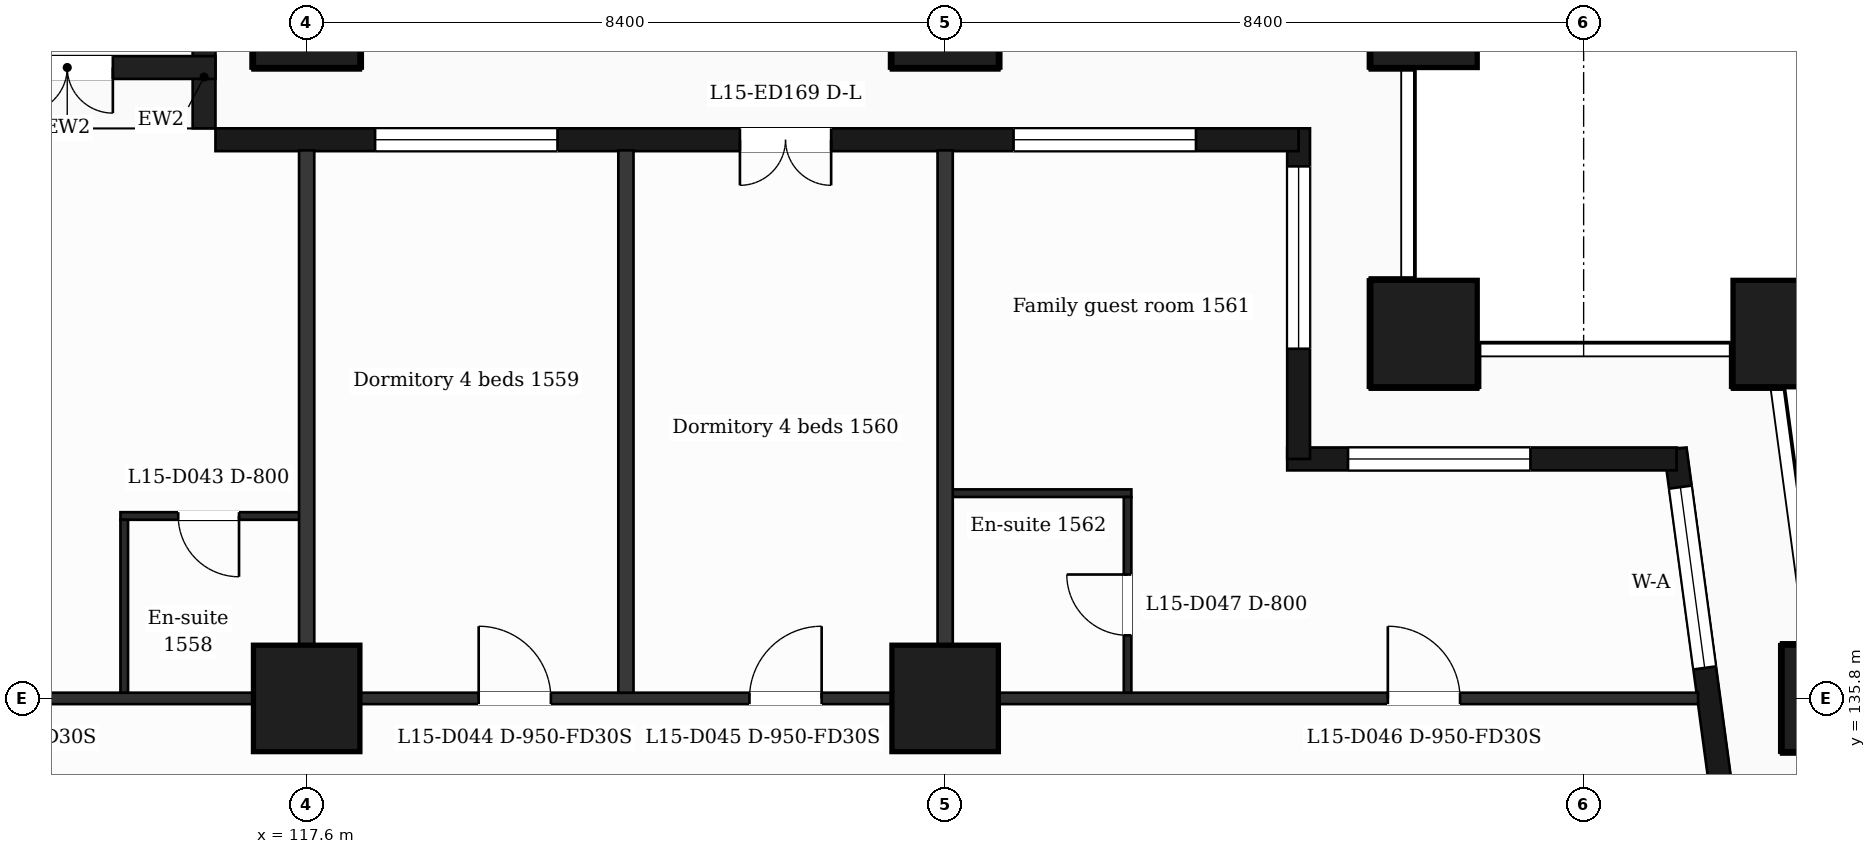
"""IFC4 building model, lengths in metres.
Left out: names, types, materials, properties, quantities, classifications, styles, units other than length and angle.
Written with IfcOpenShell. Run it as: python <this file> out.ifc"""

import sys

from ifc_helpers import new_model, si_unit, direction, frame, frame_2d, origin, origin_2d, place, context, subcontext, project, spatial, rectangle, extrude, element, fill, save


model = new_model("IFC4")
c1 = context("Model", 3, precision=1e-05, world=origin(), true_north=direction((0.0, 1.0)))
c2 = subcontext(c1, "Body", "Model", "MODEL_VIEW")
j1 = project(units=[si_unit("LENGTHUNIT", "METRE"), si_unit("PLANEANGLEUNIT", "RADIAN")], contexts=[c1])
p1 = place(None, origin())
s1 = spatial("IfcSite", under=j1, at=p1, CompositionType="ELEMENT")
p2 = place(p1, origin())
s2 = spatial("IfcBuilding", under=s1, at=p2, CompositionType="ELEMENT")
p3 = place(p2, frame((0.0, 0.0, 70.5)))
s3 = spatial("IfcBuildingStorey", under=s2, at=p3, CompositionType="ELEMENT", Elevation=70.5)
for number, where, z_axis, x_axis in (
    (1, (132.3, 140.6, 0.0), (0.0, 0.0, 1.0), (1.0, 0.0, 0.0)),
    (2, (137.065, 140.6, 0.0), (0.0, 0.0, 1.0), (1.0, 0.0, 0.0)),
    (3, (117.6, 135.8, 0.0), (0.0, 0.0, 1.0), (1.0, 0.0, 0.0)),
    (4, (126.0, 135.8, 0.0), (0.0, 0.0, 1.0), (1.0, 0.0, 0.0)),
    (5, (137.711, 135.8, 0.0), (0.0, 0.0, 1.0), (1.0, 0.0, 0.0)),
    (6, (117.6, 144.8, 0.0), (0.0, 0.0, 1.0), (1.0, 0.0, 0.0)),
    (7, (126.0, 144.8, 0.0), (0.0, 0.0, 1.0), (1.0, 0.0, 0.0)),
    (8, (132.3, 144.8, 0.0), (0.0, 0.0, 1.0), (1.0, 0.0, 0.0)),
):
    element("IfcColumn", number, at=place(p3, frame(where, z_axis=z_axis, x_axis=x_axis)), inside=s3, PredefinedType="COLUMN", context=c2, shape_type="SweptSolid", body=[
        extrude(rectangle(XDim=1.4, YDim=1.4, at=origin_2d()), origin(), (0.0, 0.0, 1.0), 3.5),
    ])
p4 = place(p3, frame((136.504, 132.4, 0.0), z_axis=(0.0, 0.0, 1.0), x_axis=(-0.133399697462, 0.99106231929, 0.0)))
e9 = element("IfcWall", 9, at=p4, inside=s3, PredefinedType="SOLIDWALL", context=c2, shape_type="SweptSolid", body=[
    extrude(rectangle(XDim=6.74, YDim=0.3, at=frame_2d((3.37, 0.0))), origin(), (0.0, 0.0, 1.0), 3.18),
])
p5 = place(p4, frame((1.115, 0.0, 0.0)))
e10 = element("IfcOpeningElement", 10, at=p5, cuts=e9, PredefinedType="OPENING", context=c2, shape_type="SweptSolid", body=[
    extrude(rectangle(XDim=1.2, YDim=2.4, at=frame_2d((0.6, 1.2))), frame((0.0, 0.16, 0.0), z_axis=(0.0, -1.0, 0.0), x_axis=(1.0, 0.0, 0.0)), (0.0, 0.0, 1.0), 0.32),
])
p6 = place(p4, frame((3.835, 0.0, 0.9)))
e11 = element("IfcOpeningElement", 11, at=p6, cuts=e9, PredefinedType="OPENING", context=c2, shape_type="SweptSolid", body=[
    extrude(rectangle(XDim=2.4, YDim=2.1, at=frame_2d((1.2, 1.05))), frame((0.0, 0.16, 0.0), z_axis=(0.0, -1.0, 0.0), x_axis=(1.0, 0.0, 0.0)), (0.0, 0.0, 1.0), 0.32),
])
p7 = place(p3, frame((135.623, 138.95, 0.0), z_axis=(0.0, 0.0, 1.0), x_axis=(-1.0, 0.0, 0.0)))
e12 = element("IfcWall", 12, at=p7, inside=s3, PredefinedType="SOLIDWALL", context=c2, shape_type="SweptSolid", body=[
    extrude(rectangle(XDim=5.123, YDim=0.3, at=frame_2d((2.561, 0.0))), origin(), (0.0, 0.0, 1.0), 3.18),
])
p8 = place(p7, frame((1.923, 0.0, 0.9)))
e13 = element("IfcOpeningElement", 13, at=p8, cuts=e12, PredefinedType="OPENING", context=c2, shape_type="SweptSolid", body=[
    extrude(rectangle(XDim=2.4, YDim=2.1, at=frame_2d((1.2, 1.05))), frame((0.0, 0.16, 0.0), z_axis=(0.0, -1.0, 0.0), x_axis=(1.0, 0.0, 0.0)), (0.0, 0.0, 1.0), 0.32),
])
p9 = place(p3, frame((130.65, 138.95, 0.0), z_axis=(0.0, 0.0, 1.0), x_axis=(0.0, 1.0, 0.0)))
e14 = element("IfcWall", 14, at=p9, inside=s3, PredefinedType="SOLIDWALL", context=c2, shape_type="SweptSolid", body=[
    extrude(rectangle(XDim=4.35, YDim=0.3, at=frame_2d((2.175, 0.0))), origin(), (0.0, 0.0, 1.0), 3.18),
])
p10 = place(p9, frame((1.45, 0.0, 0.9)))
e15 = element("IfcOpeningElement", 15, at=p10, cuts=e14, PredefinedType="OPENING", context=c2, shape_type="SweptSolid", body=[
    extrude(rectangle(XDim=2.4, YDim=2.1, at=frame_2d((1.2, 1.05))), frame((0.0, 0.16, 0.0), z_axis=(0.0, -1.0, 0.0), x_axis=(1.0, 0.0, 0.0)), (0.0, 0.0, 1.0), 0.32),
])
p11 = place(p3, frame((130.65, 143.15, 0.0), z_axis=(0.0, 0.0, 1.0), x_axis=(-1.0, 0.0, 0.0)))
e16 = element("IfcWall", 16, at=p11, inside=s3, PredefinedType="SOLIDWALL", context=c2, shape_type="SweptSolid", body=[
    extrude(rectangle(XDim=14.25, YDim=0.3, at=frame_2d((7.125, 0.0))), origin(), (0.0, 0.0, 1.0), 3.18),
])
p12 = place(p11, frame((1.35, 0.0, 0.9)))
e17 = element("IfcOpeningElement", 17, at=p12, cuts=e16, PredefinedType="OPENING", context=c2, shape_type="SweptSolid", body=[
    extrude(rectangle(XDim=2.4, YDim=2.1, at=frame_2d((1.2, 1.05))), frame((0.0, 0.16, 0.0), z_axis=(0.0, -1.0, 0.0), x_axis=(1.0, 0.0, 0.0)), (0.0, 0.0, 1.0), 0.32),
])
p13 = place(p11, frame((6.15, 0.0, 0.0)))
e18 = element("IfcOpeningElement", 18, at=p13, cuts=e16, PredefinedType="OPENING", context=c2, shape_type="SweptSolid", body=[
    extrude(rectangle(XDim=1.2, YDim=2.4, at=frame_2d((0.6, 1.2))), frame((0.0, 0.16, 0.0), z_axis=(0.0, -1.0, 0.0), x_axis=(1.0, 0.0, 0.0)), (0.0, 0.0, 1.0), 0.32),
])
p14 = place(p11, frame((9.75, 0.0, 0.9)))
e19 = element("IfcOpeningElement", 19, at=p14, cuts=e16, PredefinedType="OPENING", context=c2, shape_type="SweptSolid", body=[
    extrude(rectangle(XDim=2.4, YDim=2.1, at=frame_2d((1.2, 1.05))), frame((0.0, 0.16, 0.0), z_axis=(0.0, -1.0, 0.0), x_axis=(1.0, 0.0, 0.0)), (0.0, 0.0, 1.0), 0.32),
])
p15 = place(p3, frame((116.25, 143.3, 0.0), z_axis=(0.0, 0.0, 1.0), x_axis=(0.0, 1.0, 0.0)))
e20 = element("IfcWall", 20, at=p15, inside=s3, PredefinedType="SOLIDWALL", context=c2, shape_type="SweptSolid", body=[
    extrude(rectangle(XDim=1.35, YDim=0.3, at=frame_2d((0.675, 0.0))), origin(), (0.0, 0.0, 1.0), 3.18),
])
p16 = place(p3, frame((116.4, 144.1, 0.0), z_axis=(0.0, 0.0, 1.0), x_axis=(-1.0, 0.0, 0.0)))
e21 = element("IfcWall", 21, at=p16, inside=s3, PredefinedType="SOLIDWALL", context=c2, shape_type="SweptSolid", body=[
    extrude(rectangle(XDim=3.9, YDim=0.3, at=frame_2d((1.95, 0.0))), origin(), (0.0, 0.0, 1.0), 3.18),
])
p17 = place(p16, frame((1.35, 0.0, 0.0)))
e22 = element("IfcOpeningElement", 22, at=p17, cuts=e21, PredefinedType="OPENING", context=c2, shape_type="SweptSolid", body=[
    extrude(rectangle(XDim=1.2, YDim=2.4, at=frame_2d((0.6, 1.2))), frame((0.0, 0.16, 0.0), z_axis=(0.0, -1.0, 0.0), x_axis=(1.0, 0.0, 0.0)), (0.0, 0.0, 1.0), 0.32),
])
p18 = place(p3, frame((90.895, 135.8, 0.0), z_axis=(0.0, 0.0, 1.0), x_axis=(1.0, 0.0, 0.0)))
e23 = element("IfcWall", 23, at=p18, inside=s3, PredefinedType="PARTITIONING", context=c2, shape_type="SweptSolid", body=[
    extrude(rectangle(XDim=45.011, YDim=0.15, at=frame_2d((22.505, 0.0))), origin(), (0.0, 0.0, 1.0), 3.18),
])
p19 = place(p18, frame((7.068, 0.0, 0.0)))
e24 = element("IfcOpeningElement", 24, at=p19, cuts=e23, PredefinedType="OPENING", context=c2, shape_type="SweptSolid", body=[
    extrude(rectangle(XDim=0.95, YDim=2.1, at=frame_2d((0.475, 1.05))), frame((0.0, 0.085, 0.0), z_axis=(0.0, -1.0, 0.0), x_axis=(1.0, 0.0, 0.0)), (0.0, 0.0, 1.0), 0.17),
])
p20 = place(p18, frame((10.892, 0.0, 0.0)))
e25 = element("IfcOpeningElement", 25, at=p20, cuts=e23, PredefinedType="OPENING", context=c2, shape_type="SweptSolid", body=[
    extrude(rectangle(XDim=0.95, YDim=2.1, at=frame_2d((0.475, 1.05))), frame((0.0, 0.085, 0.0), z_axis=(0.0, -1.0, 0.0), x_axis=(1.0, 0.0, 0.0)), (0.0, 0.0, 1.0), 0.17),
])
p21 = place(p18, frame((16.455, 0.0, 0.0)))
e26 = element("IfcOpeningElement", 26, at=p21, cuts=e23, PredefinedType="OPENING", context=c2, shape_type="SweptSolid", body=[
    extrude(rectangle(XDim=0.95, YDim=2.1, at=frame_2d((0.475, 1.05))), frame((0.0, 0.085, 0.0), z_axis=(0.0, -1.0, 0.0), x_axis=(1.0, 0.0, 0.0)), (0.0, 0.0, 1.0), 0.17),
])
p22 = place(p18, frame((21.918, 0.0, 0.0)))
e27 = element("IfcOpeningElement", 27, at=p22, cuts=e23, PredefinedType="OPENING", context=c2, shape_type="SweptSolid", body=[
    extrude(rectangle(XDim=0.95, YDim=2.1, at=frame_2d((0.475, 1.05))), frame((0.0, 0.085, 0.0), z_axis=(0.0, -1.0, 0.0), x_axis=(1.0, 0.0, 0.0)), (0.0, 0.0, 1.0), 0.17),
])
p23 = place(p18, frame((28.969, 0.0, 0.0)))
e28 = element("IfcOpeningElement", 28, at=p23, cuts=e23, PredefinedType="OPENING", context=c2, shape_type="SweptSolid", body=[
    extrude(rectangle(XDim=0.95, YDim=2.1, at=frame_2d((0.475, 1.05))), frame((0.0, 0.085, 0.0), z_axis=(0.0, -1.0, 0.0), x_axis=(1.0, 0.0, 0.0)), (0.0, 0.0, 1.0), 0.17),
])
p24 = place(p18, frame((32.531, 0.0, 0.0)))
e29 = element("IfcOpeningElement", 29, at=p24, cuts=e23, PredefinedType="OPENING", context=c2, shape_type="SweptSolid", body=[
    extrude(rectangle(XDim=0.95, YDim=2.1, at=frame_2d((0.475, 1.05))), frame((0.0, 0.085, 0.0), z_axis=(0.0, -1.0, 0.0), x_axis=(1.0, 0.0, 0.0)), (0.0, 0.0, 1.0), 0.17),
])
p25 = place(p18, frame((40.929, 0.0, 0.0)))
e30 = element("IfcOpeningElement", 30, at=p25, cuts=e23, PredefinedType="OPENING", context=c2, shape_type="SweptSolid", body=[
    extrude(rectangle(XDim=0.95, YDim=2.1, at=frame_2d((0.475, 1.05))), frame((0.0, 0.085, 0.0), z_axis=(0.0, -1.0, 0.0), x_axis=(1.0, 0.0, 0.0)), (0.0, 0.0, 1.0), 0.17),
])
p26 = place(p3, frame((115.15, 138.2, 0.0), z_axis=(0.0, 0.0, 1.0), x_axis=(1.0, 0.0, 0.0)))
e31 = element("IfcWall", 31, at=p26, inside=s3, PredefinedType="PARTITIONING", context=c2, shape_type="SweptSolid", body=[
    extrude(rectangle(XDim=2.45, YDim=0.1, at=frame_2d((1.225, 0.0))), origin(), (0.0, 0.0, 1.0), 3.18),
])
p27 = place(p26, frame((0.76, 0.0, 0.0)))
e32 = element("IfcOpeningElement", 32, at=p27, cuts=e31, PredefinedType="OPENING", context=c2, shape_type="SweptSolid", body=[
    extrude(rectangle(XDim=0.8, YDim=2.1, at=frame_2d((0.4, 1.05))), frame((0.0, 0.06, 0.0), z_axis=(0.0, -1.0, 0.0), x_axis=(1.0, 0.0, 0.0)), (0.0, 0.0, 1.0), 0.12),
])
p28 = place(p3, frame((126.0, 138.5, 0.0), z_axis=(0.0, 0.0, 1.0), x_axis=(1.0, 0.0, 0.0)))
e33 = element("IfcWall", 33, at=p28, inside=s3, PredefinedType="PARTITIONING", context=c2, shape_type="SweptSolid", body=[
    extrude(rectangle(XDim=2.45, YDim=0.1, at=frame_2d((1.225, 0.0))), origin(), (0.0, 0.0, 1.0), 3.18),
])
p29 = place(p3, frame((115.2, 135.875, 0.0), z_axis=(0.0, 0.0, 1.0), x_axis=(0.0, 1.0, 0.0)))
e34 = element("IfcWall", 34, at=p29, inside=s3, PredefinedType="PARTITIONING", context=c2, shape_type="SweptSolid", body=[
    extrude(rectangle(XDim=2.275, YDim=0.1, at=frame_2d((1.137, 0.0))), origin(), (0.0, 0.0, 1.0), 3.18),
])
for number, where, z_axis, x_axis in (
    (35, (117.6, 135.875, 0.0), (0.0, 0.0, 1.0), (0.0, 1.0, 0.0)),
    (36, (121.8, 135.875, 0.0), (0.0, 0.0, 1.0), (0.0, 1.0, 0.0)),
    (37, (126.0, 135.875, 0.0), (0.0, 0.0, 1.0), (0.0, 1.0, 0.0)),
):
    element("IfcWall", number, at=place(p3, frame(where, z_axis=z_axis, x_axis=x_axis)), inside=s3, PredefinedType="PARTITIONING", context=c2, shape_type="SweptSolid", body=[
        extrude(rectangle(XDim=7.135, YDim=0.2, at=frame_2d((3.567, 0.0))), origin(), (0.0, 0.0, 1.0), 3.18),
    ])
p30 = place(p3, frame((128.4, 135.875, 0.0), z_axis=(0.0, 0.0, 1.0), x_axis=(0.0, 1.0, 0.0)))
e38 = element("IfcWall", 38, at=p30, inside=s3, PredefinedType="PARTITIONING", context=c2, shape_type="SweptSolid", body=[
    extrude(rectangle(XDim=2.575, YDim=0.1, at=frame_2d((1.288, 0.0))), origin(), (0.0, 0.0, 1.0), 3.18),
])
p31 = place(p30, frame((0.755, 0.0, 0.0)))
e39 = element("IfcOpeningElement", 39, at=p31, cuts=e38, PredefinedType="OPENING", context=c2, shape_type="SweptSolid", body=[
    extrude(rectangle(XDim=0.8, YDim=2.1, at=frame_2d((0.4, 1.05))), frame((0.0, 0.06, 0.0), z_axis=(0.0, -1.0, 0.0), x_axis=(1.0, 0.0, 0.0)), (0.0, 0.0, 1.0), 0.12),
])
p32 = place(p6, origin())
e40 = element("IfcWindow", 40, at=p32, inside=s3, PartitioningType="SINGLE_PANEL", PredefinedType="WINDOW", context=c2, shape_type="SweptSolid", body=[
    extrude(rectangle(XDim=2.4, YDim=2.1, at=frame_2d((1.2, 1.05))), frame((0.0, 0.03, 0.0), z_axis=(0.0, -1.0, 0.0), x_axis=(1.0, 0.0, 0.0)), (0.0, 0.0, 1.0), 0.06),
])
fill(e11, e40)
p33 = place(p8, origin())
e41 = element("IfcWindow", 41, at=p33, inside=s3, PartitioningType="SINGLE_PANEL", PredefinedType="WINDOW", context=c2, shape_type="SweptSolid", body=[
    extrude(rectangle(XDim=2.4, YDim=2.1, at=frame_2d((1.2, 1.05))), frame((0.0, 0.03, 0.0), z_axis=(0.0, -1.0, 0.0), x_axis=(1.0, 0.0, 0.0)), (0.0, 0.0, 1.0), 0.06),
])
fill(e13, e41)
p34 = place(p10, origin())
e42 = element("IfcWindow", 42, at=p34, inside=s3, PartitioningType="SINGLE_PANEL", PredefinedType="WINDOW", context=c2, shape_type="SweptSolid", body=[
    extrude(rectangle(XDim=2.4, YDim=2.1, at=frame_2d((1.2, 1.05))), frame((0.0, 0.03, 0.0), z_axis=(0.0, -1.0, 0.0), x_axis=(1.0, 0.0, 0.0)), (0.0, 0.0, 1.0), 0.06),
])
fill(e15, e42)
p35 = place(p12, origin())
e43 = element("IfcWindow", 43, at=p35, inside=s3, PartitioningType="SINGLE_PANEL", PredefinedType="WINDOW", context=c2, shape_type="SweptSolid", body=[
    extrude(rectangle(XDim=2.4, YDim=2.1, at=frame_2d((1.2, 1.05))), frame((0.0, 0.03, 0.0), z_axis=(0.0, -1.0, 0.0), x_axis=(1.0, 0.0, 0.0)), (0.0, 0.0, 1.0), 0.06),
])
fill(e17, e43)
p36 = place(p13, origin())
e44 = element("IfcDoor", 44, at=p36, inside=s3, OperationType="DOUBLE_DOOR_SINGLE_SWING", PredefinedType="DOOR", context=c2, shape_type="SweptSolid", body=[
    extrude(rectangle(XDim=1.2, YDim=2.4, at=frame_2d((0.6, 1.2))), frame((0.0, 0.025, 0.0), z_axis=(0.0, -1.0, 0.0), x_axis=(1.0, 0.0, 0.0)), (0.0, 0.0, 1.0), 0.05),
])
fill(e18, e44)
p37 = place(p14, origin())
e45 = element("IfcWindow", 45, at=p37, inside=s3, PartitioningType="SINGLE_PANEL", PredefinedType="WINDOW", context=c2, shape_type="SweptSolid", body=[
    extrude(rectangle(XDim=2.4, YDim=2.1, at=frame_2d((1.2, 1.05))), frame((0.0, 0.03, 0.0), z_axis=(0.0, -1.0, 0.0), x_axis=(1.0, 0.0, 0.0)), (0.0, 0.0, 1.0), 0.06),
])
fill(e19, e45)
p38 = place(p17, origin())
e46 = element("IfcDoor", 46, at=p38, inside=s3, OperationType="DOUBLE_DOOR_SINGLE_SWING", PredefinedType="DOOR", context=c2, shape_type="SweptSolid", body=[
    extrude(rectangle(XDim=1.2, YDim=2.4, at=frame_2d((0.6, 1.2))), frame((0.0, 0.025, 0.0), z_axis=(0.0, -1.0, 0.0), x_axis=(1.0, 0.0, 0.0)), (0.0, 0.0, 1.0), 0.05),
])
fill(e22, e46)
p39 = place(p27, origin())
e47 = element("IfcDoor", 47, at=p39, inside=s3, OperationType="SINGLE_SWING_RIGHT", PredefinedType="DOOR", context=c2, shape_type="SweptSolid", body=[
    extrude(rectangle(XDim=0.8, YDim=2.1, at=frame_2d((0.4, 1.05))), frame((0.0, 0.025, 0.0), z_axis=(0.0, -1.0, 0.0), x_axis=(1.0, 0.0, 0.0)), (0.0, 0.0, 1.0), 0.05),
])
fill(e32, e47)
p40 = place(p23, origin())
e48 = element("IfcDoor", 48, at=p40, inside=s3, OperationType="SINGLE_SWING_LEFT", PredefinedType="DOOR", context=c2, shape_type="SweptSolid", body=[
    extrude(rectangle(XDim=0.95, YDim=2.1, at=frame_2d((0.475, 1.05))), frame((0.0, 0.025, 0.0), z_axis=(0.0, -1.0, 0.0), x_axis=(1.0, 0.0, 0.0)), (0.0, 0.0, 1.0), 0.05),
])
fill(e28, e48)
p41 = place(p24, origin())
e49 = element("IfcDoor", 49, at=p41, inside=s3, OperationType="SINGLE_SWING_RIGHT", PredefinedType="DOOR", context=c2, shape_type="SweptSolid", body=[
    extrude(rectangle(XDim=0.95, YDim=2.1, at=frame_2d((0.475, 1.05))), frame((0.0, 0.025, 0.0), z_axis=(0.0, -1.0, 0.0), x_axis=(1.0, 0.0, 0.0)), (0.0, 0.0, 1.0), 0.05),
])
fill(e29, e49)
p42 = place(p25, origin())
e50 = element("IfcDoor", 50, at=p42, inside=s3, OperationType="SINGLE_SWING_LEFT", PredefinedType="DOOR", context=c2, shape_type="SweptSolid", body=[
    extrude(rectangle(XDim=0.95, YDim=2.1, at=frame_2d((0.475, 1.05))), frame((0.0, 0.025, 0.0), z_axis=(0.0, -1.0, 0.0), x_axis=(1.0, 0.0, 0.0)), (0.0, 0.0, 1.0), 0.05),
])
fill(e30, e50)
p43 = place(p31, origin())
e51 = element("IfcDoor", 51, at=p43, inside=s3, OperationType="SINGLE_SWING_RIGHT", PredefinedType="DOOR", context=c2, shape_type="SweptSolid", body=[
    extrude(rectangle(XDim=0.8, YDim=2.1, at=frame_2d((0.4, 1.05))), frame((0.0, 0.025, 0.0), z_axis=(0.0, -1.0, 0.0), x_axis=(1.0, 0.0, 0.0)), (0.0, 0.0, 1.0), 0.05),
])
fill(e39, e51)
save(model, sys.argv[1])
